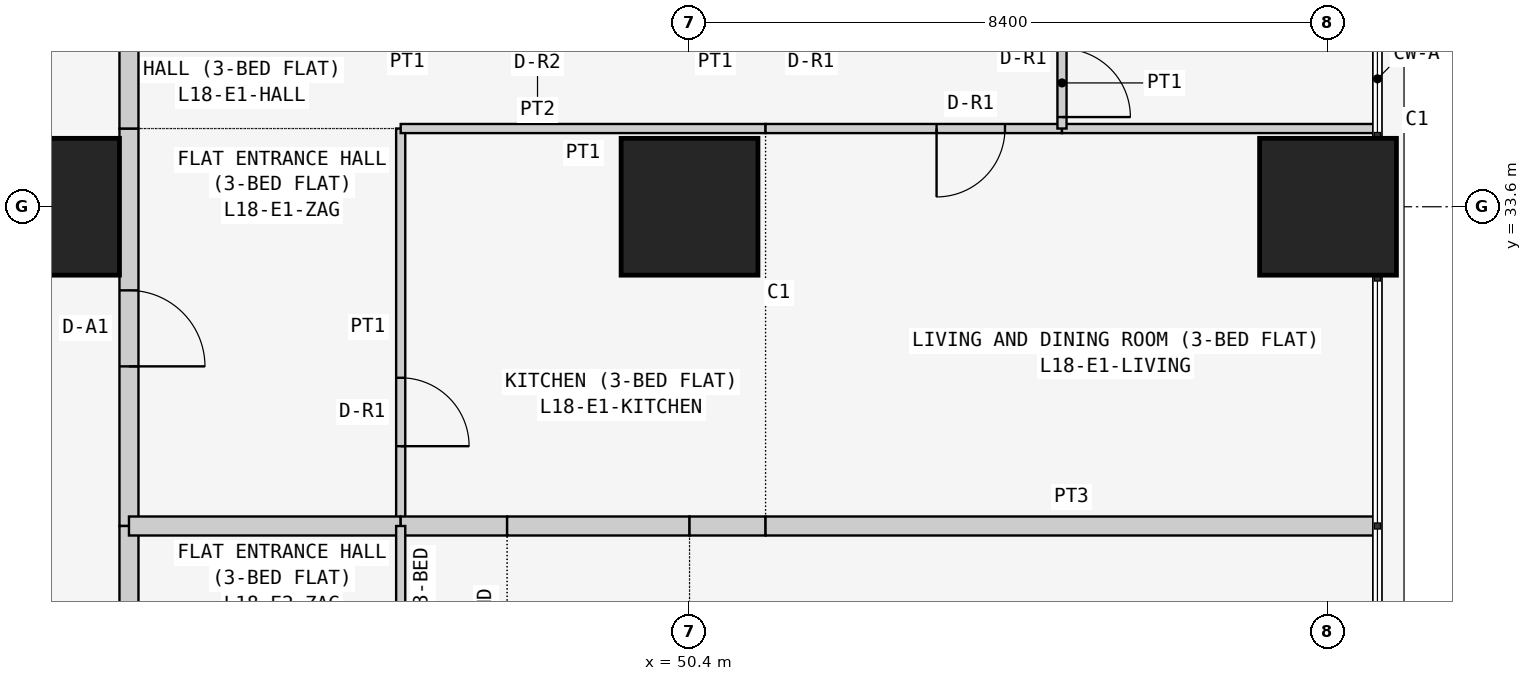
"""IFC4 building model, lengths in metres.
Left out: names, types, materials, properties, quantities, classifications, styles, units other than length and angle.
Written with IfcOpenShell. Run it as: python <this file> out.ifc"""

import sys

from ifc_helpers import new_model, si_unit, direction, frame, frame_2d, origin, origin_2d, place, context, subcontext, project, spatial, rectangle, extrude, element, fill, save


model = new_model("IFC4")
c1 = context("Model", 3, precision=1e-05, world=origin(), true_north=direction((0.0, 1.0)))
c2 = subcontext(c1, "Body", "Model", "MODEL_VIEW")
j1 = project(units=[si_unit("LENGTHUNIT", "METRE"), si_unit("PLANEANGLEUNIT", "RADIAN")], contexts=[c1])
p1 = place(None, origin())
s1 = spatial("IfcSite", under=j1, at=p1, CompositionType="ELEMENT")
p2 = place(p1, origin())
s2 = spatial("IfcBuilding", under=s1, at=p2, CompositionType="ELEMENT")
p3 = place(p2, frame((0.0, 0.0, 74.1)))
s3 = spatial("IfcBuildingStorey", under=s2, at=p3, CompositionType="ELEMENT", Elevation=74.1)
for number, where, z_axis, x_axis in (
    (1, (42.0, 33.6, 0.0), (0.0, 0.0, 1.0), (1.0, 0.0, 0.0)),
    (2, (50.4, 33.6, 0.0), (0.0, 0.0, 1.0), (1.0, 0.0, 0.0)),
    (3, (58.8, 33.6, 0.0), (0.0, 0.0, 1.0), (1.0, 0.0, 0.0)),
):
    element("IfcColumn", number, at=place(p3, frame(where, z_axis=z_axis, x_axis=x_axis)), inside=s3, PredefinedType="COLUMN", context=c2, shape_type="SweptSolid", body=[
        extrude(rectangle(XDim=1.8, YDim=1.8, at=origin_2d()), origin(), (0.0, 0.0, 1.0), 3.6),
    ])
p4 = place(p3, frame((43.025, 34.629, 0.0), z_axis=(0.0, 0.0, 1.0), x_axis=(0.0, -1.0, 0.0)))
e4 = element("IfcWall", 4, at=p4, inside=s3, PredefinedType="PARTITIONING", context=c2, shape_type="SweptSolid", body=[
    extrude(rectangle(XDim=5.229, YDim=0.25, at=frame_2d((2.615, 0.0))), origin(), (0.0, 0.0, 1.0), 3.45),
])
p5 = place(p4, frame((2.129, 0.0, 0.0)))
e5 = element("IfcOpeningElement", 5, at=p5, cuts=e4, PredefinedType="OPENING", context=c2, shape_type="SweptSolid", body=[
    extrude(rectangle(XDim=1.0, YDim=2.1, at=frame_2d((0.5, 1.05))), frame((0.0, 0.135, 0.0), z_axis=(0.0, -1.0, 0.0), x_axis=(1.0, 0.0, 0.0)), (0.0, 0.0, 1.0), 0.27),
])
p6 = place(p3, frame((43.025, 35.829, 0.0), z_axis=(0.0, 0.0, 1.0), x_axis=(0.0, -1.0, 0.0)))
e6 = element("IfcWall", 6, at=p6, inside=s3, PredefinedType="PARTITIONING", context=c2, shape_type="SweptSolid", body=[
    extrude(rectangle(XDim=1.2, YDim=0.25, at=frame_2d((0.6, 0.0))), origin(), (0.0, 0.0, 1.0), 3.45),
])
p7 = place(p3, frame((43.025, 29.4, 0.0), z_axis=(0.0, 0.0, 1.0), x_axis=(0.0, -1.0, 0.0)))
e7 = element("IfcWall", 7, at=p7, inside=s3, PredefinedType="PARTITIONING", context=c2, shape_type="SweptSolid", body=[
    extrude(rectangle(XDim=5.229, YDim=0.25, at=frame_2d((2.615, 0.0))), origin(), (0.0, 0.0, 1.0), 3.45),
])
p8 = place(p7, frame((2.1, 0.0, 0.0)))
e8 = element("IfcOpeningElement", 8, at=p8, cuts=e7, PredefinedType="OPENING", context=c2, shape_type="SweptSolid", body=[
    extrude(rectangle(XDim=1.0, YDim=2.1, at=frame_2d((0.5, 1.05))), frame((0.0, 0.135, 0.0), z_axis=(0.0, -1.0, 0.0), x_axis=(1.0, 0.0, 0.0)), (0.0, 0.0, 1.0), 0.27),
])
p9 = place(p3, frame((46.6, 29.4, 0.0), z_axis=(0.0, 0.0, 1.0), x_axis=(0.0, 1.0, 0.0)))
e9 = element("IfcWall", 9, at=p9, inside=s3, PredefinedType="PARTITIONING", context=c2, shape_type="SweptSolid", body=[
    extrude(rectangle(XDim=5.229, YDim=0.12, at=frame_2d((2.615, 0.0))), origin(), (0.0, 0.0, 1.0), 3.45),
])
p10 = place(p9, frame((1.05, 0.0, 0.0)))
e10 = element("IfcOpeningElement", 10, at=p10, cuts=e9, PredefinedType="OPENING", context=c2, shape_type="SweptSolid", body=[
    extrude(rectangle(XDim=0.9, YDim=2.1, at=frame_2d((0.45, 1.05))), frame((0.0, 0.07, 0.0), z_axis=(0.0, -1.0, 0.0), x_axis=(1.0, 0.0, 0.0)), (0.0, 0.0, 1.0), 0.14),
])
p11 = place(p3, frame((43.025, 29.4, 0.0), z_axis=(0.0, 0.0, 1.0), x_axis=(1.0, 0.0, 0.0)))
e11 = element("IfcWall", 11, at=p11, inside=s3, PredefinedType="PARTITIONING", context=c2, shape_type="SweptSolid", body=[
    extrude(rectangle(XDim=3.575, YDim=0.25, at=frame_2d((1.788, 0.0))), origin(), (0.0, 0.0, 1.0), 3.45),
])
p12 = place(p3, frame((51.4, 34.629, 0.0), z_axis=(0.0, 0.0, 1.0), x_axis=(-1.0, 0.0, 0.0)))
e12 = element("IfcWall", 12, at=p12, inside=s3, PredefinedType="PARTITIONING", context=c2, shape_type="SweptSolid", body=[
    extrude(rectangle(XDim=4.8, YDim=0.12, at=frame_2d((2.4, 0.0))), origin(), (0.0, 0.0, 1.0), 3.45),
])
p13 = place(p3, frame((46.6, 29.4, 0.0), z_axis=(0.0, 0.0, 1.0), x_axis=(1.0, 0.0, 0.0)))
e13 = element("IfcWall", 13, at=p13, inside=s3, PredefinedType="PARTITIONING", context=c2, shape_type="SweptSolid", body=[
    extrude(rectangle(XDim=1.4, YDim=0.25, at=frame_2d((0.7, 0.0))), origin(), (0.0, 0.0, 1.0), 3.45),
])
p14 = place(p3, frame((48.0, 29.4, 0.0), z_axis=(0.0, 0.0, 1.0), x_axis=(1.0, 0.0, 0.0)))
e14 = element("IfcWall", 14, at=p14, inside=s3, PredefinedType="PARTITIONING", context=c2, shape_type="SweptSolid", body=[
    extrude(rectangle(XDim=2.4, YDim=0.25, at=frame_2d((1.2, 0.0))), origin(), (0.0, 0.0, 1.0), 3.45),
])
p15 = place(p3, frame((50.4, 29.4, 0.0), z_axis=(0.0, 0.0, 1.0), x_axis=(1.0, 0.0, 0.0)))
e15 = element("IfcWall", 15, at=p15, inside=s3, PredefinedType="PARTITIONING", context=c2, shape_type="SweptSolid", body=[
    extrude(rectangle(XDim=1.0, YDim=0.25, at=frame_2d((0.5, 0.0))), origin(), (0.0, 0.0, 1.0), 3.45),
])
p16 = place(p3, frame((55.3, 34.629, 0.0), z_axis=(0.0, 0.0, 1.0), x_axis=(-1.0, 0.0, 0.0)))
e16 = element("IfcWall", 16, at=p16, inside=s3, PredefinedType="PARTITIONING", context=c2, shape_type="SweptSolid", body=[
    extrude(rectangle(XDim=3.9, YDim=0.12, at=frame_2d((1.95, 0.0))), origin(), (0.0, 0.0, 1.0), 3.45),
])
p17 = place(p16, frame((0.75, 0.0, 0.0)))
e17 = element("IfcOpeningElement", 17, at=p17, cuts=e16, PredefinedType="OPENING", context=c2, shape_type="SweptSolid", body=[
    extrude(rectangle(XDim=0.9, YDim=2.1, at=frame_2d((0.45, 1.05))), frame((0.0, 0.07, 0.0), z_axis=(0.0, -1.0, 0.0), x_axis=(1.0, 0.0, 0.0)), (0.0, 0.0, 1.0), 0.14),
])
p18 = place(p3, frame((59.45, 34.629, 0.0), z_axis=(0.0, 0.0, 1.0), x_axis=(-1.0, 0.0, 0.0)))
e18 = element("IfcWall", 18, at=p18, inside=s3, PredefinedType="PARTITIONING", context=c2, shape_type="SweptSolid", body=[
    extrude(rectangle(XDim=4.15, YDim=0.12, at=frame_2d((2.075, 0.0))), origin(), (0.0, 0.0, 1.0), 3.45),
])
p19 = place(p3, frame((51.4, 29.4, 0.0), z_axis=(0.0, 0.0, 1.0), x_axis=(1.0, 0.0, 0.0)))
e19 = element("IfcWall", 19, at=p19, inside=s3, PredefinedType="PARTITIONING", context=c2, shape_type="SweptSolid", body=[
    extrude(rectangle(XDim=8.05, YDim=0.25, at=frame_2d((4.025, 0.0))), origin(), (0.0, 0.0, 1.0), 3.45),
])
p20 = place(p3, frame((55.3, 34.629, 0.0), z_axis=(0.0, 0.0, 1.0), x_axis=(0.0, 1.0, 0.0)))
e20 = element("IfcWall", 20, at=p20, inside=s3, PredefinedType="PARTITIONING", context=c2, shape_type="SweptSolid", body=[
    extrude(rectangle(XDim=1.2, YDim=0.12, at=frame_2d((0.6, 0.0))), origin(), (0.0, 0.0, 1.0), 3.45),
])
p21 = place(p20, frame((0.151, 0.0, 0.0)))
e21 = element("IfcOpeningElement", 21, at=p21, cuts=e20, PredefinedType="OPENING", context=c2, shape_type="SweptSolid", body=[
    extrude(rectangle(XDim=0.9, YDim=2.1, at=frame_2d((0.45, 1.05))), frame((0.0, 0.07, 0.0), z_axis=(0.0, -1.0, 0.0), x_axis=(1.0, 0.0, 0.0)), (0.0, 0.0, 1.0), 0.14),
])
p22 = place(p3, frame((46.6, 29.4, 0.0), z_axis=(0.0, 0.0, 1.0), x_axis=(0.0, -1.0, 0.0)))
e22 = element("IfcWall", 22, at=p22, inside=s3, PredefinedType="PARTITIONING", context=c2, shape_type="SweptSolid", body=[
    extrude(rectangle(XDim=5.229, YDim=0.12, at=frame_2d((2.615, 0.0))), origin(), (0.0, 0.0, 1.0), 3.45),
])
p23 = place(p5, origin())
e23 = element("IfcDoor", 23, at=p23, inside=s3, OperationType="SINGLE_SWING_RIGHT", PredefinedType="DOOR", context=c2, shape_type="SweptSolid", body=[
    extrude(rectangle(XDim=1.0, YDim=2.1, at=frame_2d((0.5, 1.05))), frame((0.0, 0.025, 0.0), z_axis=(0.0, -1.0, 0.0), x_axis=(1.0, 0.0, 0.0)), (0.0, 0.0, 1.0), 0.05),
])
fill(e5, e23)
p24 = place(p10, frame((0.9, 0.0, 0.0), z_axis=(0.0, 0.0, 1.0), x_axis=(-1.0, 0.0, 0.0)))
e24 = element("IfcDoor", 24, at=p24, inside=s3, OperationType="SINGLE_SWING_RIGHT", PredefinedType="DOOR", context=c2, shape_type="SweptSolid", body=[
    extrude(rectangle(XDim=0.9, YDim=2.1, at=frame_2d((0.45, 1.05))), frame((0.0, 0.025, 0.0), z_axis=(0.0, -1.0, 0.0), x_axis=(1.0, 0.0, 0.0)), (0.0, 0.0, 1.0), 0.05),
])
fill(e10, e24)
p25 = place(p17, origin())
e25 = element("IfcDoor", 25, at=p25, inside=s3, OperationType="SINGLE_SWING_RIGHT", PredefinedType="DOOR", context=c2, shape_type="SweptSolid", body=[
    extrude(rectangle(XDim=0.9, YDim=2.1, at=frame_2d((0.45, 1.05))), frame((0.0, 0.025, 0.0), z_axis=(0.0, -1.0, 0.0), x_axis=(1.0, 0.0, 0.0)), (0.0, 0.0, 1.0), 0.05),
])
fill(e17, e25)
p26 = place(p21, frame((0.9, 0.0, 0.0), z_axis=(0.0, 0.0, 1.0), x_axis=(-1.0, 0.0, 0.0)))
e26 = element("IfcDoor", 26, at=p26, inside=s3, OperationType="SINGLE_SWING_RIGHT", PredefinedType="DOOR", context=c2, shape_type="SweptSolid", body=[
    extrude(rectangle(XDim=0.9, YDim=2.1, at=frame_2d((0.45, 1.05))), frame((0.0, 0.025, 0.0), z_axis=(0.0, -1.0, 0.0), x_axis=(1.0, 0.0, 0.0)), (0.0, 0.0, 1.0), 0.05),
])
fill(e21, e26)
save(model, sys.argv[1])
